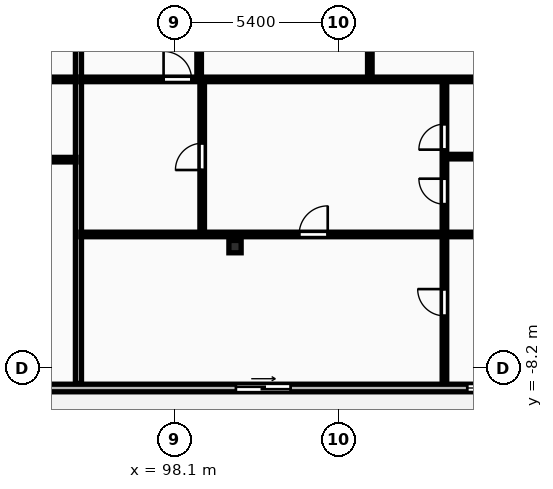
"""IFC4 building model, lengths in metres.
Left out: names, types, materials, properties, quantities, classifications, styles, units other than length and angle.
Written with IfcOpenShell. Run it as: python <this file> out.ifc"""

import sys

from ifc_helpers import new_model, si_unit, direction, frame, frame_2d, origin, origin_2d, place, context, subcontext, project, spatial, rectangle, i_section, extrude, element, fill, save


model = new_model("IFC4")
c1 = context("Model", 3, precision=1e-05, world=origin(), true_north=direction((0.0, 1.0)))
c2 = subcontext(c1, "Body", "Model", "MODEL_VIEW")
j1 = project(units=[si_unit("LENGTHUNIT", "METRE"), si_unit("PLANEANGLEUNIT", "RADIAN")], contexts=[c1])
p1 = place(None, origin())
s1 = spatial("IfcSite", under=j1, at=p1, CompositionType="ELEMENT")
p2 = place(p1, origin())
s2 = spatial("IfcBuilding", under=s1, at=p2, CompositionType="ELEMENT")
p3 = place(p2, frame((0.0, 0.0, 142.9)))
s3 = spatial("IfcBuildingStorey", under=s2, at=p3, CompositionType="ELEMENT", Elevation=142.9)
p4 = place(p3, frame((100.1, -4.2, 0.0), z_axis=(0.0, 0.0, 1.0), x_axis=(1.0, 0.0, 0.0)))
e1 = element("IfcColumn", 1, at=p4, inside=s3, PredefinedType="COLUMN", context=c2, shape_type="SweptSolid", body=[
    extrude(i_section(OverallWidth=0.403, OverallDepth=0.406, WebThickness=0.027, FlangeThickness=0.043, FilletRadius=0.015, at=origin_2d()), origin(), (0.0, 0.0, 1.0), 3.6),
])
p5 = place(p3, frame((72.7, -8.85, 0.0), z_axis=(0.0, 0.0, 1.0), x_axis=(1.0, 0.0, 0.0)))
e2 = element("IfcWall", 2, at=p5, inside=s3, PredefinedType="STANDARD", context=c2, shape_type="SweptSolid", body=[
    extrude(rectangle(XDim=58.0, YDim=0.25, at=frame_2d((29.0, 0.0))), origin(), (0.0, 0.0, 1.0), 3.31),
])
p6 = place(p5, frame((6.73, 0.0, 0.85)))
e3 = element("IfcOpeningElement", 3, at=p6, cuts=e2, PredefinedType="OPENING", context=c2, shape_type="SweptSolid", body=[
    extrude(rectangle(XDim=2.4, YDim=1.9, at=frame_2d((1.2, 0.95))), frame((0.0, 0.135, 0.0), z_axis=(0.0, -1.0, 0.0), x_axis=(1.0, 0.0, 0.0)), (0.0, 0.0, 1.0), 0.27),
])
p7 = place(p5, frame((12.7, 0.0, 0.85)))
e4 = element("IfcOpeningElement", 4, at=p7, cuts=e2, PredefinedType="OPENING", context=c2, shape_type="SweptSolid", body=[
    extrude(rectangle(XDim=2.4, YDim=1.9, at=frame_2d((1.2, 0.95))), frame((0.0, 0.135, 0.0), z_axis=(0.0, -1.0, 0.0), x_axis=(1.0, 0.0, 0.0)), (0.0, 0.0, 1.0), 0.27),
])
p8 = place(p5, frame((1.45, 0.0, 0.0)))
e5 = element("IfcOpeningElement", 5, at=p8, cuts=e2, PredefinedType="OPENING", context=c2, shape_type="SweptSolid", body=[
    extrude(rectangle(XDim=1.8, YDim=2.2, at=frame_2d((0.9, 1.1))), frame((0.0, 0.135, 0.0), z_axis=(0.0, -1.0, 0.0), x_axis=(1.0, 0.0, 0.0)), (0.0, 0.0, 1.0), 0.27),
])
p9 = place(p5, frame((18.125, 0.0, 0.85)))
e6 = element("IfcOpeningElement", 6, at=p9, cuts=e2, PredefinedType="OPENING", context=c2, shape_type="SweptSolid", body=[
    extrude(rectangle(XDim=2.4, YDim=1.9, at=frame_2d((1.2, 0.95))), frame((0.0, 0.135, 0.0), z_axis=(0.0, -1.0, 0.0), x_axis=(1.0, 0.0, 0.0)), (0.0, 0.0, 1.0), 0.27),
])
p10 = place(p5, frame((27.429, 0.0, 0.0)))
e7 = element("IfcOpeningElement", 7, at=p10, cuts=e2, PredefinedType="OPENING", context=c2, shape_type="SweptSolid", body=[
    extrude(rectangle(XDim=1.8, YDim=2.2, at=frame_2d((0.9, 1.1))), frame((0.0, 0.135, 0.0), z_axis=(0.0, -1.0, 0.0), x_axis=(1.0, 0.0, 0.0)), (0.0, 0.0, 1.0), 0.27),
])
p11 = place(p5, frame((35.038, 0.0, 0.85)))
e8 = element("IfcOpeningElement", 8, at=p11, cuts=e2, PredefinedType="OPENING", context=c2, shape_type="SweptSolid", body=[
    extrude(rectangle(XDim=1.8, YDim=1.8, at=frame_2d((0.9, 0.9))), frame((0.0, 0.135, 0.0), z_axis=(0.0, -1.0, 0.0), x_axis=(1.0, 0.0, 0.0)), (0.0, 0.0, 1.0), 0.27),
])
p12 = place(p5, frame((44.124, 0.0, 0.85)))
e9 = element("IfcOpeningElement", 9, at=p12, cuts=e2, PredefinedType="OPENING", context=c2, shape_type="SweptSolid", body=[
    extrude(rectangle(XDim=2.4, YDim=1.9, at=frame_2d((1.2, 0.95))), frame((0.0, 0.135, 0.0), z_axis=(0.0, -1.0, 0.0), x_axis=(1.0, 0.0, 0.0)), (0.0, 0.0, 1.0), 0.27),
])
p13 = place(p5, frame((49.604, 0.0, 0.85)))
e10 = element("IfcOpeningElement", 10, at=p13, cuts=e2, PredefinedType="OPENING", context=c2, shape_type="SweptSolid", body=[
    extrude(rectangle(XDim=2.4, YDim=1.9, at=frame_2d((1.2, 0.95))), frame((0.0, 0.135, 0.0), z_axis=(0.0, -1.0, 0.0), x_axis=(1.0, 0.0, 0.0)), (0.0, 0.0, 1.0), 0.27),
])
p14 = place(p5, frame((39.368, 0.0, 0.0)))
e11 = element("IfcOpeningElement", 11, at=p14, cuts=e2, PredefinedType="OPENING", context=c2, shape_type="SweptSolid", body=[
    extrude(rectangle(XDim=1.8, YDim=2.2, at=frame_2d((0.9, 1.1))), frame((0.0, 0.135, 0.0), z_axis=(0.0, -1.0, 0.0), x_axis=(1.0, 0.0, 0.0)), (0.0, 0.0, 1.0), 0.27),
])
p15 = place(p5, frame((54.575, 0.0, 0.85)))
e12 = element("IfcOpeningElement", 12, at=p15, cuts=e2, PredefinedType="OPENING", context=c2, shape_type="SweptSolid", body=[
    extrude(rectangle(XDim=2.4, YDim=1.9, at=frame_2d((1.2, 0.95))), frame((0.0, 0.135, 0.0), z_axis=(0.0, -1.0, 0.0), x_axis=(1.0, 0.0, 0.0)), (0.0, 0.0, 1.0), 0.27),
])
p16 = place(p3, frame((94.95, -8.7, 0.0), z_axis=(0.0, 0.0, 1.0), x_axis=(0.0, 1.0, 0.0)))
e13 = element("IfcWall", 13, at=p16, inside=s3, PredefinedType="PARTITIONING", context=c2, shape_type="SweptSolid", body=[
    extrude(rectangle(XDim=24.57, YDim=0.2, at=frame_2d((12.285, 0.0))), origin(), (0.0, 0.0, 1.0), 3.31),
])
p17 = place(p3, frame((77.32, -1.34, 0.0), z_axis=(0.0, 0.0, 1.0), x_axis=(1.0, 0.0, 0.0)))
e14 = element("IfcWall", 14, at=p17, inside=s3, PredefinedType="PARTITIONING", context=c2, shape_type="SweptSolid", body=[
    extrude(rectangle(XDim=17.55, YDim=0.15, at=frame_2d((8.775, 0.0))), origin(), (0.0, 0.0, 1.0), 3.31),
])
p18 = place(p17, frame((1.21, 0.0, 0.0)))
e15 = element("IfcOpeningElement", 15, at=p18, cuts=e14, PredefinedType="OPENING", context=c2, shape_type="SweptSolid", body=[
    extrude(rectangle(XDim=0.84, YDim=2.04, at=frame_2d((0.42, 1.02))), frame((0.0, 0.085, 0.0), z_axis=(0.0, -1.0, 0.0), x_axis=(1.0, 0.0, 0.0)), (0.0, 0.0, 1.0), 0.17),
])
p19 = place(p17, frame((8.355, 0.0, 0.0)))
e16 = element("IfcOpeningElement", 16, at=p19, cuts=e14, PredefinedType="OPENING", context=c2, shape_type="SweptSolid", body=[
    extrude(rectangle(XDim=0.84, YDim=2.04, at=frame_2d((0.42, 1.02))), frame((0.0, 0.085, 0.0), z_axis=(0.0, -1.0, 0.0), x_axis=(1.0, 0.0, 0.0)), (0.0, 0.0, 1.0), 0.17),
])
p20 = place(p17, frame((12.15, 0.0, 0.0)))
e17 = element("IfcOpeningElement", 17, at=p20, cuts=e14, PredefinedType="OPENING", context=c2, shape_type="SweptSolid", body=[
    extrude(rectangle(XDim=0.84, YDim=2.04, at=frame_2d((0.42, 1.02))), frame((0.0, 0.085, 0.0), z_axis=(0.0, -1.0, 0.0), x_axis=(1.0, 0.0, 0.0)), (0.0, 0.0, 1.0), 0.17),
])
p21 = place(p3, frame((72.78, 1.3, 0.0), z_axis=(0.0, 0.0, 1.0), x_axis=(1.0, 0.0, 0.0)))
e18 = element("IfcWall", 18, at=p21, inside=s3, PredefinedType="PARTITIONING", context=c2, shape_type="SweptSolid", body=[
    extrude(rectangle(XDim=22.09, YDim=0.15, at=frame_2d((11.045, 0.0))), origin(), (0.0, 0.0, 1.0), 3.31),
])
p22 = place(p21, frame((2.72, 0.0, 0.0)))
e19 = element("IfcOpeningElement", 19, at=p22, cuts=e18, PredefinedType="OPENING", context=c2, shape_type="SweptSolid", body=[
    extrude(rectangle(XDim=0.92, YDim=2.08, at=frame_2d((0.46, 1.04))), frame((0.0, 0.085, 0.0), z_axis=(0.0, -1.0, 0.0), x_axis=(1.0, 0.0, 0.0)), (0.0, 0.0, 1.0), 0.17),
])
p23 = place(p3, frame((104.534, 1.34, 0.0), z_axis=(0.0, 0.0, 1.0), x_axis=(0.0, 1.0, 0.0)))
e20 = element("IfcWall", 20, at=p23, inside=s3, PredefinedType="PARTITIONING", context=c2, shape_type="SweptSolid", body=[
    extrude(rectangle(XDim=7.455, YDim=0.15, at=frame_2d((3.728, 0.0))), origin(), (0.0, 0.0, 1.0), 3.31),
])
p24 = place(p23, frame((3.308, 0.0, 0.0)))
e21 = element("IfcOpeningElement", 21, at=p24, cuts=e20, PredefinedType="OPENING", context=c2, shape_type="SweptSolid", body=[
    extrude(rectangle(XDim=0.84, YDim=2.04, at=frame_2d((0.42, 1.02))), frame((0.0, 0.085, 0.0), z_axis=(0.0, -1.0, 0.0), x_axis=(1.0, 0.0, 0.0)), (0.0, 0.0, 1.0), 0.17),
])
p25 = place(p3, frame((98.92, 1.34, 0.0), z_axis=(0.0, 0.0, 1.0), x_axis=(0.0, 1.0, 0.0)))
e22 = element("IfcWall", 22, at=p25, inside=s3, PredefinedType="PARTITIONING", context=c2, shape_type="SweptSolid", body=[
    extrude(rectangle(XDim=14.55, YDim=0.15, at=frame_2d((7.275, 0.0))), origin(), (0.0, 0.0, 1.0), 3.31),
])
p26 = place(p25, frame((3.098, 0.0, 0.0)))
e23 = element("IfcOpeningElement", 23, at=p26, cuts=e22, PredefinedType="OPENING", context=c2, shape_type="SweptSolid", body=[
    extrude(rectangle(XDim=0.88, YDim=2.06, at=frame_2d((0.44, 1.03))), frame((0.0, 0.085, 0.0), z_axis=(0.0, -1.0, 0.0), x_axis=(1.0, 0.0, 0.0)), (0.0, 0.0, 1.0), 0.17),
])
p27 = place(p3, frame((99.02, -3.74, 0.0), z_axis=(0.0, 0.0, 1.0), x_axis=(0.0, 1.0, 0.0)))
e24 = element("IfcWall", 24, at=p27, inside=s3, PredefinedType="PARTITIONING", context=c2, shape_type="SweptSolid", body=[
    extrude(rectangle(XDim=5.0, YDim=0.15, at=frame_2d((2.5, 0.0))), origin(), (0.0, 0.0, 1.0), 3.31),
])
p28 = place(p27, frame((2.06, 0.0, 0.0)))
e25 = element("IfcOpeningElement", 25, at=p28, cuts=e24, PredefinedType="OPENING", context=c2, shape_type="SweptSolid", body=[
    extrude(rectangle(XDim=0.88, YDim=2.06, at=frame_2d((0.44, 1.03))), frame((0.0, 0.085, 0.0), z_axis=(0.0, -1.0, 0.0), x_axis=(1.0, 0.0, 0.0)), (0.0, 0.0, 1.0), 0.17),
])
p29 = place(p3, frame((107.048, -1.24, 0.0), z_axis=(0.0, 0.0, 1.0), x_axis=(1.0, 0.0, 0.0)))
e26 = element("IfcWall", 26, at=p29, inside=s3, PredefinedType="PARTITIONING", context=c2, shape_type="SweptSolid", body=[
    extrude(rectangle(XDim=3.28, YDim=0.15, at=frame_2d((1.64, 0.0))), origin(), (0.0, 0.0, 1.0), 3.31),
])
p30 = place(p3, frame((106.988, -8.7, 0.0), z_axis=(0.0, 0.0, 1.0), x_axis=(0.0, 1.0, 0.0)))
e27 = element("IfcWall", 27, at=p30, inside=s3, PredefinedType="PARTITIONING", context=c2, shape_type="SweptSolid", body=[
    extrude(rectangle(XDim=9.96, YDim=0.15, at=frame_2d((4.98, 0.0))), origin(), (0.0, 0.0, 1.0), 3.31),
])
p31 = place(p30, frame((5.894, 0.0, 0.0)))
e28 = element("IfcOpeningElement", 28, at=p31, cuts=e27, PredefinedType="OPENING", context=c2, shape_type="SweptSolid", body=[
    extrude(rectangle(XDim=0.84, YDim=2.04, at=frame_2d((0.42, 1.02))), frame((0.0, 0.085, 0.0), z_axis=(0.0, -1.0, 0.0), x_axis=(1.0, 0.0, 0.0)), (0.0, 0.0, 1.0), 0.17),
])
p32 = place(p30, frame((7.69, 0.0, 0.0)))
e29 = element("IfcOpeningElement", 29, at=p32, cuts=e27, PredefinedType="OPENING", context=c2, shape_type="SweptSolid", body=[
    extrude(rectangle(XDim=0.84, YDim=2.04, at=frame_2d((0.42, 1.02))), frame((0.0, 0.085, 0.0), z_axis=(0.0, -1.0, 0.0), x_axis=(1.0, 0.0, 0.0)), (0.0, 0.0, 1.0), 0.17),
])
p33 = place(p30, frame((2.223, 0.0, 0.0)))
e30 = element("IfcOpeningElement", 30, at=p33, cuts=e27, PredefinedType="OPENING", context=c2, shape_type="SweptSolid", body=[
    extrude(rectangle(XDim=0.88, YDim=2.06, at=frame_2d((0.44, 1.03))), frame((0.0, 0.085, 0.0), z_axis=(0.0, -1.0, 0.0), x_axis=(1.0, 0.0, 0.0)), (0.0, 0.0, 1.0), 0.17),
])
p34 = place(p3, frame((95.03, 1.3, 0.0), z_axis=(0.0, 0.0, 1.0), x_axis=(1.0, 0.0, 0.0)))
e31 = element("IfcWall", 31, at=p34, inside=s3, PredefinedType="PARTITIONING", context=c2, shape_type="SweptSolid", body=[
    extrude(rectangle(XDim=15.298, YDim=0.15, at=frame_2d((7.649, 0.0))), origin(), (0.0, 0.0, 1.0), 3.31),
])
p35 = place(p34, frame((2.72, 0.0, 0.0)))
e32 = element("IfcOpeningElement", 32, at=p35, cuts=e31, PredefinedType="OPENING", context=c2, shape_type="SweptSolid", body=[
    extrude(rectangle(XDim=0.92, YDim=2.08, at=frame_2d((0.46, 1.04))), frame((0.0, 0.085, 0.0), z_axis=(0.0, -1.0, 0.0), x_axis=(1.0, 0.0, 0.0)), (0.0, 0.0, 1.0), 0.17),
])
p36 = place(p3, frame((95.03, -3.8, 0.0), z_axis=(0.0, 0.0, 1.0), x_axis=(1.0, 0.0, 0.0)))
e33 = element("IfcWall", 33, at=p36, inside=s3, PredefinedType="PARTITIONING", context=c2, shape_type="SweptSolid", body=[
    extrude(rectangle(XDim=15.298, YDim=0.15, at=frame_2d((7.649, 0.0))), origin(), (0.0, 0.0, 1.0), 3.31),
])
p37 = place(p36, frame((7.179, 0.0, 0.0)))
e34 = element("IfcOpeningElement", 34, at=p37, cuts=e33, PredefinedType="OPENING", context=c2, shape_type="SweptSolid", body=[
    extrude(rectangle(XDim=0.94, YDim=2.1, at=frame_2d((0.47, 1.05))), frame((0.0, 0.085, 0.0), z_axis=(0.0, -1.0, 0.0), x_axis=(1.0, 0.0, 0.0)), (0.0, 0.0, 1.0), 0.17),
])
p38 = place(p10, origin())
e35 = element("IfcDoor", 35, at=p38, inside=s3, OperationType="SLIDING_TO_RIGHT", PredefinedType="DOOR", context=c2, shape_type="SweptSolid", body=[
    extrude(rectangle(XDim=1.8, YDim=2.2, at=frame_2d((0.9, 1.1))), frame((0.0, 0.025, 0.0), z_axis=(0.0, -1.0, 0.0), x_axis=(1.0, 0.0, 0.0)), (0.0, 0.0, 1.0), 0.05),
])
fill(e7, e35)
p39 = place(p11, origin())
e36 = element("IfcWindow", 36, at=p39, inside=s3, PartitioningType="SINGLE_PANEL", PredefinedType="WINDOW", context=c2, shape_type="SweptSolid", body=[
    extrude(rectangle(XDim=1.8, YDim=1.8, at=frame_2d((0.9, 0.9))), frame((0.0, 0.03, 0.0), z_axis=(0.0, -1.0, 0.0), x_axis=(1.0, 0.0, 0.0)), (0.0, 0.0, 1.0), 0.06),
])
fill(e8, e36)
p40 = place(p28, origin())
e37 = element("IfcDoor", 37, at=p40, inside=s3, OperationType="SINGLE_SWING_LEFT", PredefinedType="DOOR", context=c2, shape_type="SweptSolid", body=[
    extrude(rectangle(XDim=0.88, YDim=2.06, at=frame_2d((0.44, 1.03))), frame((0.0, 0.025, 0.0), z_axis=(0.0, -1.0, 0.0), x_axis=(1.0, 0.0, 0.0)), (0.0, 0.0, 1.0), 0.05),
])
fill(e25, e37)
p41 = place(p31, origin())
e38 = element("IfcDoor", 38, at=p41, inside=s3, OperationType="SINGLE_SWING_RIGHT", PredefinedType="DOOR", context=c2, shape_type="SweptSolid", body=[
    extrude(rectangle(XDim=0.84, YDim=2.04, at=frame_2d((0.42, 1.02))), frame((0.0, 0.025, 0.0), z_axis=(0.0, -1.0, 0.0), x_axis=(1.0, 0.0, 0.0)), (0.0, 0.0, 1.0), 0.05),
])
fill(e28, e38)
p42 = place(p32, origin())
e39 = element("IfcDoor", 39, at=p42, inside=s3, OperationType="SINGLE_SWING_LEFT", PredefinedType="DOOR", context=c2, shape_type="SweptSolid", body=[
    extrude(rectangle(XDim=0.84, YDim=2.04, at=frame_2d((0.42, 1.02))), frame((0.0, 0.025, 0.0), z_axis=(0.0, -1.0, 0.0), x_axis=(1.0, 0.0, 0.0)), (0.0, 0.0, 1.0), 0.05),
])
fill(e29, e39)
p43 = place(p33, origin())
e40 = element("IfcDoor", 40, at=p43, inside=s3, OperationType="SINGLE_SWING_RIGHT", PredefinedType="DOOR", context=c2, shape_type="SweptSolid", body=[
    extrude(rectangle(XDim=0.88, YDim=2.06, at=frame_2d((0.44, 1.03))), frame((0.0, 0.025, 0.0), z_axis=(0.0, -1.0, 0.0), x_axis=(1.0, 0.0, 0.0)), (0.0, 0.0, 1.0), 0.05),
])
fill(e30, e40)
p44 = place(p35, origin())
e41 = element("IfcDoor", 41, at=p44, inside=s3, OperationType="SINGLE_SWING_LEFT", PredefinedType="DOOR", context=c2, shape_type="SweptSolid", body=[
    extrude(rectangle(XDim=0.92, YDim=2.08, at=frame_2d((0.46, 1.04))), frame((0.0, 0.025, 0.0), z_axis=(0.0, -1.0, 0.0), x_axis=(1.0, 0.0, 0.0)), (0.0, 0.0, 1.0), 0.05),
])
fill(e32, e41)
p45 = place(p37, origin())
e42 = element("IfcDoor", 42, at=p45, inside=s3, OperationType="SINGLE_SWING_RIGHT", PredefinedType="DOOR", context=c2, shape_type="SweptSolid", body=[
    extrude(rectangle(XDim=0.94, YDim=2.1, at=frame_2d((0.47, 1.05))), frame((0.0, 0.025, 0.0), z_axis=(0.0, -1.0, 0.0), x_axis=(1.0, 0.0, 0.0)), (0.0, 0.0, 1.0), 0.05),
])
fill(e34, e42)
save(model, sys.argv[1])
